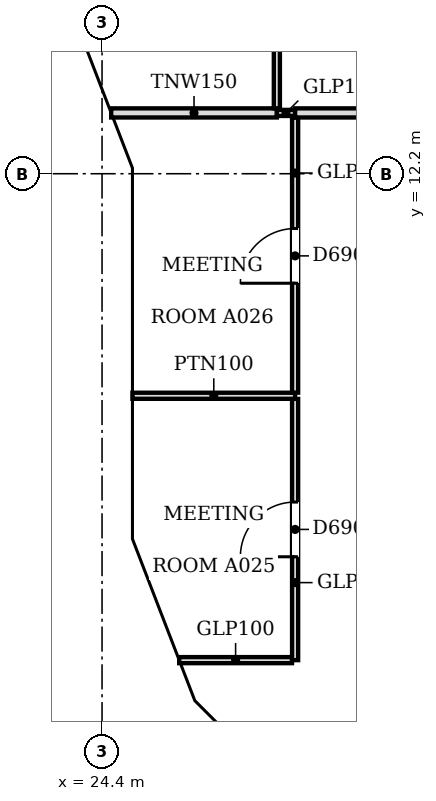
"""IFC4 building model, lengths in metres.
Left out: names, types, materials, properties, quantities, classifications, styles, units other than length and angle.
Written with IfcOpenShell. Run it as: python <this file> out.ifc"""

import sys

from ifc_helpers import new_model, si_unit, direction, frame, frame_2d, origin, place, context, subcontext, project, spatial, polyline, rectangle, outline, extrude, faceted_brep, source, transform, mapped, element, fill, save


model = new_model("IFC4")
c1 = context("Model", 3, precision=1e-05, world=origin(), true_north=direction((0.0, 1.0)))
c2 = subcontext(c1, "Body", "Model", "MODEL_VIEW")
j1 = project(units=[si_unit("LENGTHUNIT", "METRE"), si_unit("PLANEANGLEUNIT", "RADIAN")], contexts=[c1])
p1 = place(None, origin())
s1 = spatial("IfcSite", under=j1, at=p1, CompositionType="ELEMENT")
p2 = place(p1, origin())
s2 = spatial("IfcBuilding", under=s1, at=p2, CompositionType="ELEMENT")
p3 = place(p2, frame((0.0, 0.0, 209.3)))
s3 = spatial("IfcBuildingStorey", under=s2, at=p3, CompositionType="ELEMENT", Elevation=209.3)
m1 = source(origin(), c2, "Body", "Brep", [
    faceted_brep([(3.103, -0.25, 7.544), (0.053, -0.25, 3.864), (0.053, -0.25, 3.736), (3.103, -0.25, 0.056), (0.0, 0.25, 3.8), (3.149, 0.25, 7.6), (3.196, 0.25, 7.543), (3.196, 0.25, 0.057), (3.149, 0.25, 0.0), (3.149, -0.0, 0.0), (3.149, -0.0, 7.6), (0.0, 0.0, 3.8)], [[[0, 1, 2, 3]], [[4, 5, 6, 7, 8]], [[8, 7, 9]], [[6, 5, 10]], [[5, 4, 11, 1, 0, 10]], [[4, 8, 9, 3, 2, 11]], [[11, 2, 1]], [[3, 9, 7, 6, 10, 0]]]),
])
p4 = place(p3, frame((23.517, 15.185, -3.8), z_axis=(0.0, 0.0, 1.0), x_axis=(0.359864468756, -0.933004589553, 0.0)))
e1 = element("IfcWall", 1, at=p4, inside=s3, PredefinedType="SOLIDWALL", context=c2, shape_type="MappedRepresentation", body=[
    mapped(m1, transform((0.0, 0.0, 0.0), scale=1.0)),
])
m2 = source(origin(), c2, "Body", "SweptSolid", [
    extrude(outline(polyline([(2.949, 6.967), (0.325, 3.8), (2.949, 0.633), (2.949, 6.967)])), frame((0.0, 0.26, 0.0), z_axis=(0.0, -1.0, 0.0), x_axis=(1.0, 0.0, 0.0)), (0.0, 0.0, 1.0), 0.52),
])
p5 = place(p4, origin())
e2 = element("IfcOpeningElement", 2, at=p5, cuts=e1, PredefinedType="OPENING", context=c2, shape_type="MappedRepresentation", body=[
    mapped(m2, transform((0.0, 0.0, 0.0), scale=1.0)),
])
m3 = source(origin(), c2, "Body", "Brep", [
    faceted_brep([(0.093, -0.25, 0.057), (3.143, -0.25, 3.8), (0.093, -0.25, 7.543), (0.0, 0.25, 7.544), (0.047, 0.25, 7.6), (3.143, 0.25, 3.8), (0.047, 0.25, 0.0), (0.0, 0.25, 0.056), (0.047, 0.0, 0.0), (0.047, 0.0, 7.6)], [[[0, 1, 2]], [[3, 4, 5, 6, 7]], [[6, 5, 1, 0, 8]], [[5, 4, 9, 2, 1]], [[4, 3, 9]], [[7, 6, 8]], [[7, 8, 0, 2, 9, 3]]]),
])
p6 = place(p3, frame((24.65, 12.293, -3.8), z_axis=(0.0, 0.0, 1.0), x_axis=(0.0, -1.0, 0.0)))
e3 = element("IfcWall", 3, at=p6, inside=s3, PredefinedType="SOLIDWALL", context=c2, shape_type="MappedRepresentation", body=[
    mapped(m3, transform((0.0, 0.0, 0.0), scale=1.0)),
])
m4 = source(origin(), c2, "Body", "SweptSolid", [
    extrude(outline(polyline([(0.247, 0.641), (2.821, 3.8), (0.247, 6.959), (0.247, 0.641)])), frame((0.0, 0.26, 0.0), z_axis=(0.0, -1.0, 0.0), x_axis=(1.0, 0.0, 0.0)), (0.0, 0.0, 1.0), 0.52),
])
p7 = place(p6, origin())
e4 = element("IfcOpeningElement", 4, at=p7, cuts=e3, PredefinedType="OPENING", context=c2, shape_type="MappedRepresentation", body=[
    mapped(m4, transform((0.0, 0.0, 0.0), scale=1.0)),
])
m5 = source(origin(), c2, "Body", "Brep", [
    faceted_brep([(3.003, -0.25, 0.0), (3.05, -0.25, 0.06), (3.05, -0.25, 7.54), (3.003, -0.25, 7.6), (0.0, -0.25, 3.8), (0.0, 0.25, 3.8), (2.957, 0.25, 7.541), (2.957, 0.25, 0.059), (3.003, 0.0, 0.0), (3.003, 0.0, 7.6)], [[[0, 1, 2, 3, 4]], [[5, 6, 7]], [[1, 0, 8]], [[9, 3, 2]], [[6, 5, 4, 3, 9]], [[5, 7, 8, 0, 4]], [[1, 8, 7, 6, 9, 2]]]),
])
p8 = place(p3, frame((24.65, 9.15, -3.8), z_axis=(0.0, 0.0, 1.0), x_axis=(0.0, -1.0, 0.0)))
e5 = element("IfcWall", 5, at=p8, inside=s3, PredefinedType="SOLIDWALL", context=c2, shape_type="MappedRepresentation", body=[
    mapped(m5, transform((0.0, 0.0, 0.0), scale=1.0)),
])
m6 = source(origin(), c2, "Body", "SweptSolid", [
    extrude(outline(polyline([(2.803, 6.944), (0.319, 3.8), (2.803, 0.656), (2.803, 6.944)])), frame((0.0, 0.26, 0.0), z_axis=(0.0, -1.0, 0.0), x_axis=(1.0, 0.0, 0.0)), (0.0, 0.0, 1.0), 0.52),
])
p9 = place(p8, origin())
e6 = element("IfcOpeningElement", 6, at=p9, cuts=e5, PredefinedType="OPENING", context=c2, shape_type="MappedRepresentation", body=[
    mapped(m6, transform((0.0, 0.0, 0.0), scale=1.0)),
])
m7 = source(origin(), c2, "Body", "Brep", [
    faceted_brep([(0.047, -0.25, 0.0), (2.997, -0.25, 3.8), (0.047, -0.25, 7.6), (0.0, -0.25, 7.541), (0.0, -0.25, 0.059), (0.093, 0.25, 7.54), (2.944, 0.25, 3.868), (2.944, 0.25, 3.732), (0.093, 0.25, 0.06), (2.997, 0.0, 3.8), (0.047, 0.0, 0.0), (0.047, 0.0, 7.6)], [[[0, 1, 2, 3, 4]], [[5, 6, 7, 8]], [[8, 7, 9, 1, 0, 10]], [[6, 5, 11, 2, 1, 9]], [[3, 2, 11]], [[10, 0, 4]], [[8, 10, 4, 3, 11, 5]], [[9, 7, 6]]]),
])
p10 = place(p3, frame((24.633, 6.19, -3.8), z_axis=(0.0, 0.0, 1.0), x_axis=(0.359901446078, -0.932990326376, 0.0)))
e7 = element("IfcWall", 7, at=p10, inside=s3, PredefinedType="SOLIDWALL", context=c2, shape_type="MappedRepresentation", body=[
    mapped(m7, transform((0.0, 0.0, 0.0), scale=1.0)),
])
m8 = source(origin(), c2, "Body", "SweptSolid", [
    extrude(outline(polyline([(0.247, 0.665), (2.681, 3.8), (0.247, 6.935), (0.247, 0.665)])), frame((0.0, 0.26, 0.0), z_axis=(0.0, -1.0, 0.0), x_axis=(1.0, 0.0, 0.0)), (0.0, 0.0, 1.0), 0.52),
])
p11 = place(p10, origin())
e8 = element("IfcOpeningElement", 8, at=p11, cuts=e7, PredefinedType="OPENING", context=c2, shape_type="MappedRepresentation", body=[
    mapped(m8, transform((0.0, 0.0, 0.0), scale=1.0)),
])
m9 = source(origin(), c2, "Body", "Brep", [
    faceted_brep([(2.944, -0.25, 0.0), (2.997, -0.25, 0.068), (2.997, -0.25, 7.532), (2.944, -0.25, 7.6), (0.0, -0.25, 3.8), (0.053, 0.25, 3.868), (2.891, 0.25, 7.532), (2.891, 0.25, 0.068), (0.053, 0.25, 3.732), (2.944, 0.0, 0.0), (2.944, 0.0, 7.6), (0.0, 0.0, 3.8)], [[[0, 1, 2, 3, 4]], [[5, 6, 7, 8]], [[1, 0, 9]], [[10, 3, 2]], [[6, 5, 11, 4, 3, 10]], [[8, 7, 9, 0, 4, 11]], [[8, 11, 5]], [[1, 9, 7, 6, 10, 2]]]),
])
p12 = place(p3, frame((25.712, 3.394, -3.8), z_axis=(0.0, 0.0, 1.0), x_axis=(0.707066050402, -0.707147509625, 0.0)))
e9 = element("IfcWall", 9, at=p12, inside=s3, PredefinedType="SOLIDWALL", context=c2, shape_type="MappedRepresentation", body=[
    mapped(m9, transform((0.0, 0.0, 0.0), scale=1.0)),
])
m10 = source(origin(), c2, "Body", "SweptSolid", [
    extrude(outline(polyline([(2.744, 6.934), (0.316, 3.8), (2.744, 0.666), (2.744, 6.934)])), frame((0.0, 0.26, 0.0), z_axis=(0.0, -1.0, 0.0), x_axis=(1.0, 0.0, 0.0)), (0.0, 0.0, 1.0), 0.52),
])
p13 = place(p12, origin())
e10 = element("IfcOpeningElement", 10, at=p13, cuts=e9, PredefinedType="OPENING", context=c2, shape_type="MappedRepresentation", body=[
    mapped(m10, transform((0.0, 0.0, 0.0), scale=1.0)),
])
p14 = place(p2, frame((0.0, 0.0, 213.1)))
s4 = spatial("IfcBuildingStorey", under=s2, at=p14, CompositionType="ELEMENT", Elevation=213.1)
m11 = source(origin(), c2, "Body", "Brep", [
    faceted_brep([(0.106, -0.25, 0.064), (3.156, -0.25, 3.744), (3.156, -0.25, 3.856), (0.106, -0.25, 7.536), (0.0, 0.25, 7.536), (0.053, 0.25, 7.6), (3.202, 0.25, 3.8), (0.053, 0.25, 0.0), (0.0, 0.25, 0.064), (3.202, -0.0, 3.8), (0.053, 0.0, 0.0), (0.053, 0.0, 7.6)], [[[0, 1, 2, 3]], [[4, 5, 6, 7, 8]], [[7, 6, 9, 1, 0, 10]], [[6, 5, 11, 3, 2, 9]], [[5, 4, 11]], [[8, 7, 10]], [[8, 10, 0, 3, 11, 4]], [[1, 9, 2]]]),
])
p15 = place(p14, frame((23.497, 15.234, -3.8), z_axis=(0.0, 0.0, 1.0), x_axis=(0.359913782069, -0.932985567668, 0.0)))
e11 = element("IfcWall", 11, at=p15, inside=s4, PredefinedType="SOLIDWALL", context=c2, shape_type="MappedRepresentation", body=[
    mapped(m11, transform((0.0, 0.0, 0.0), scale=1.0)),
])
m12 = source(origin(), c2, "Body", "SweptSolid", [
    extrude(outline(polyline([(0.253, 0.633), (2.878, 3.8), (0.253, 6.967), (0.253, 0.633)])), frame((0.0, 0.26, 0.0), z_axis=(0.0, -1.0, 0.0), x_axis=(1.0, 0.0, 0.0)), (0.0, 0.0, 1.0), 0.52),
])
p16 = place(p15, origin())
e12 = element("IfcOpeningElement", 12, at=p16, cuts=e11, PredefinedType="OPENING", context=c2, shape_type="MappedRepresentation", body=[
    mapped(m12, transform((0.0, 0.0, 0.0), scale=1.0)),
])
m13 = source(origin(), c2, "Body", "Brep", [
    faceted_brep([(3.096, -0.25, 0.0), (6.1, -0.25, 3.8), (3.096, -0.25, 7.6), (0.047, -0.25, 3.857), (0.047, -0.25, 3.743), (0.0, 0.25, 3.8), (3.096, 0.25, 7.6), (6.053, 0.25, 3.859), (6.053, 0.25, 3.741), (3.096, 0.25, 0.0), (6.1, -0.0, 3.8), (0.0, 0.0, 3.8)], [[[0, 1, 2, 3, 4]], [[5, 6, 7, 8, 9]], [[9, 8, 10, 1, 0]], [[7, 6, 2, 1, 10]], [[6, 5, 11, 3, 2]], [[5, 9, 0, 4, 11]], [[4, 3, 11]], [[8, 7, 10]]]),
])
p17 = place(p14, frame((24.65, 12.247, -3.8), z_axis=(0.0, 0.0, 1.0), x_axis=(0.0, -1.0, 0.0)))
e13 = element("IfcWall", 13, at=p17, inside=s4, PredefinedType="SOLIDWALL", context=c2, shape_type="MappedRepresentation", body=[
    mapped(m13, transform((0.0, 0.0, 0.0), scale=1.0)),
])
m14 = source(origin(), c2, "Body", "SweptSolid", [
    extrude(outline(polyline([(3.094, 0.399), (5.781, 3.8), (3.094, 7.2), (0.323, 3.8), (3.094, 0.399)])), frame((0.0, 0.26, 0.0), z_axis=(0.0, -1.0, 0.0), x_axis=(1.0, 0.0, 0.0)), (0.0, 0.0, 1.0), 0.52),
])
p18 = place(p17, origin())
e14 = element("IfcOpeningElement", 14, at=p18, cuts=e13, PredefinedType="OPENING", context=c2, shape_type="MappedRepresentation", body=[
    mapped(m14, transform((0.0, 0.0, 0.0), scale=1.0)),
])
m15 = source(origin(), c2, "Body", "Brep", [
    faceted_brep([(2.95, -0.25, 0.0), (3.003, -0.25, 0.068), (3.003, -0.25, 7.531), (2.95, -0.25, 7.6), (0.0, -0.25, 3.8), (0.047, 0.25, 3.86), (2.898, 0.25, 7.532), (2.898, 0.25, 0.068), (0.047, 0.25, 3.74), (2.95, 0.0, 0.0), (2.95, 0.0, 7.6), (0.0, 0.0, 3.8)], [[[0, 1, 2, 3, 4]], [[5, 6, 7, 8]], [[1, 0, 9]], [[10, 3, 2]], [[6, 5, 11, 4, 3, 10]], [[8, 7, 9, 0, 4, 11]], [[8, 11, 5]], [[1, 9, 7, 6, 10, 2]]]),
])
p19 = place(p14, frame((24.65, 6.146, -3.8), z_axis=(0.0, 0.0, 1.0), x_axis=(0.359953949349, -0.932970071518, 0.0)))
e15 = element("IfcWall", 15, at=p19, inside=s4, PredefinedType="SOLIDWALL", context=c2, shape_type="MappedRepresentation", body=[
    mapped(m15, transform((0.0, 0.0, 0.0), scale=1.0)),
])
m16 = source(origin(), c2, "Body", "SweptSolid", [
    extrude(outline(polyline([(2.75, 6.935), (0.316, 3.8), (2.75, 0.665), (2.75, 6.935)])), frame((0.0, 0.26, 0.0), z_axis=(0.0, -1.0, 0.0), x_axis=(1.0, 0.0, 0.0)), (0.0, 0.0, 1.0), 0.52),
])
p20 = place(p19, origin())
e16 = element("IfcOpeningElement", 16, at=p20, cuts=e15, PredefinedType="OPENING", context=c2, shape_type="MappedRepresentation", body=[
    mapped(m16, transform((0.0, 0.0, 0.0), scale=1.0)),
])
m17 = source(origin(), c2, "Body", "Brep", [
    faceted_brep([(0.053, -0.25, 0.0), (2.997, -0.25, 3.8), (0.053, -0.25, 7.6), (0.0, -0.25, 7.532), (0.0, -0.25, 0.068), (0.106, 0.25, 7.531), (2.944, 0.25, 3.868), (2.944, 0.25, 3.732), (0.106, 0.25, 0.068), (2.997, 0.0, 3.8), (0.053, 0.0, 0.0), (0.053, 0.0, 7.6)], [[[0, 1, 2, 3, 4]], [[5, 6, 7, 8]], [[8, 7, 9, 1, 0, 10]], [[6, 5, 11, 2, 1, 9]], [[3, 2, 11]], [[10, 0, 4]], [[8, 10, 4, 3, 11, 5]], [[7, 6, 9]]]),
])
p21 = place(p14, frame((25.675, 3.431, -3.8), z_axis=(0.0, 0.0, 1.0), x_axis=(0.707106781187, -0.707106781187, 0.0)))
e17 = element("IfcWall", 17, at=p21, inside=s4, PredefinedType="SOLIDWALL", context=c2, shape_type="MappedRepresentation", body=[
    mapped(m17, transform((0.0, 0.0, 0.0), scale=1.0)),
])
m18 = source(origin(), c2, "Body", "SweptSolid", [
    extrude(outline(polyline([(0.253, 0.666), (2.681, 3.8), (0.253, 6.934), (0.253, 0.666)])), frame((0.0, 0.26, 0.0), z_axis=(0.0, -1.0, 0.0), x_axis=(1.0, 0.0, 0.0)), (0.0, 0.0, 1.0), 0.52),
])
p22 = place(p21, origin())
e18 = element("IfcOpeningElement", 18, at=p22, cuts=e17, PredefinedType="OPENING", context=c2, shape_type="MappedRepresentation", body=[
    mapped(m18, transform((0.0, 0.0, 0.0), scale=1.0)),
])
p23 = place(p3, frame((25.669, 4.2, 0.0), z_axis=(0.0, 0.0, 1.0), x_axis=(1.0, 0.0, 0.0)))
e19 = element("IfcWall", 19, at=p23, inside=s3, PredefinedType="PARTITIONING", context=c2, shape_type="SweptSolid", body=[
    extrude(rectangle(XDim=1.855, YDim=0.1, at=frame_2d((0.928, 0.0))), origin(), (0.0, 0.0, 1.0), 3.067),
])
p24 = place(p3, frame((27.575, 4.2, 0.0), z_axis=(0.0, 0.0, 1.0), x_axis=(0.0, 1.0, 0.0)))
e20 = element("IfcWall", 20, at=p24, inside=s3, PredefinedType="PARTITIONING", context=c2, shape_type="SweptSolid", body=[
    extrude(rectangle(XDim=4.297, YDim=0.1, at=frame_2d((2.148, 0.0))), origin(), (0.0, 0.0, 1.0), 3.067),
])
m19 = source(origin(), c2, "Body", "SweptSolid", [
    extrude(rectangle(XDim=0.9, YDim=2.1, at=frame_2d((0.45, 1.05))), frame((0.0, 0.06, 0.0), z_axis=(0.0, -1.0, 0.0), x_axis=(1.0, 0.0, 0.0)), (0.0, 0.0, 1.0), 0.12),
])
p25 = place(p24, frame((1.7, 0.0, 0.0)))
e21 = element("IfcOpeningElement", 21, at=p25, cuts=e20, PredefinedType="OPENING", context=c2, shape_type="MappedRepresentation", body=[
    mapped(m19, transform((0.0, 0.0, 0.0), scale=1.0)),
])
p26 = place(p3, frame((24.9, 8.548, 0.0), z_axis=(0.0, 0.0, 1.0), x_axis=(1.0, 0.0, 0.0)))
e22 = element("IfcWall", 22, at=p26, inside=s3, PredefinedType="PARTITIONING", context=c2, shape_type="SweptSolid", body=[
    extrude(rectangle(XDim=2.675, YDim=0.1, at=frame_2d((1.337, 0.0))), origin(), (0.0, 0.0, 1.0), 3.067),
])
p27 = place(p3, frame((27.575, 8.599, 0.0), z_axis=(0.0, 0.0, 1.0), x_axis=(0.0, 1.0, 0.0)))
e23 = element("IfcWall", 23, at=p27, inside=s3, PredefinedType="PARTITIONING", context=c2, shape_type="SweptSolid", body=[
    extrude(rectangle(XDim=4.525, YDim=0.1, at=frame_2d((2.263, 0.0))), origin(), (0.0, 0.0, 1.0), 3.067),
])
p28 = place(p27, frame((1.8, 0.0, 0.0)))
e24 = element("IfcOpeningElement", 24, at=p28, cuts=e23, PredefinedType="OPENING", context=c2, shape_type="MappedRepresentation", body=[
    mapped(m19, transform((0.0, 0.0, 0.0), scale=1.0)),
])
p29 = place(p3, frame((24.55, 13.2, 0.0), z_axis=(0.0, 0.0, 1.0), x_axis=(1.0, 0.0, 0.0)))
e25 = element("IfcWall", 25, at=p29, inside=s3, PredefinedType="PARTITIONING", context=c2, shape_type="SweptSolid", body=[
    extrude(rectangle(XDim=2.725, YDim=0.15, at=frame_2d((1.362, 0.0))), origin(), (0.0, 0.0, 1.0), 3.067),
])
p30 = place(p3, frame((27.276, 13.2, 0.0), z_axis=(0.0, 0.0, 1.0), x_axis=(1.0, 0.0, 0.0)))
e26 = element("IfcWall", 26, at=p30, inside=s3, PredefinedType="PARTITIONING", context=c2, shape_type="SweptSolid", body=[
    extrude(rectangle(XDim=0.298, YDim=0.1, at=frame_2d((0.149, 0.0))), origin(), (0.0, 0.0, 1.0), 3.067),
])
p31 = place(p3, frame((27.575, 13.2, 0.0), z_axis=(0.0, 0.0, 1.0), x_axis=(1.0, 0.0, 0.0)))
e27 = element("IfcWall", 27, at=p31, inside=s3, PredefinedType="PARTITIONING", context=c2, shape_type="SweptSolid", body=[
    extrude(rectangle(XDim=16.349, YDim=0.15, at=frame_2d((8.175, 0.0))), origin(), (0.0, 0.0, 1.0), 3.067),
])
p32 = place(p3, frame((27.275, 13.276, 0.0), z_axis=(0.0, 0.0, 1.0), x_axis=(0.0, 1.0, 0.0)))
e28 = element("IfcWall", 28, at=p32, inside=s3, PredefinedType="PARTITIONING", context=c2, shape_type="SweptSolid", body=[
    extrude(rectangle(XDim=5.448, YDim=0.1, at=frame_2d((2.724, 0.0))), origin(), (0.0, 0.0, 1.0), 3.067),
])
p33 = place(p32, frame((2.3, 0.0, 0.0)))
e29 = element("IfcOpeningElement", 29, at=p33, cuts=e28, PredefinedType="OPENING", context=c2, shape_type="MappedRepresentation", body=[
    mapped(m19, transform((0.0, 0.0, 0.0), scale=1.0)),
])
m20 = source(origin(), c2, "Body", "SweptSolid", [
    extrude(rectangle(XDim=0.9, YDim=2.1, at=frame_2d((0.45, 1.05))), frame((0.0, 0.025, 0.0), z_axis=(0.0, -1.0, 0.0), x_axis=(1.0, 0.0, 0.0)), (0.0, 0.0, 1.0), 0.05),
])
p34 = place(p28, origin())
e30 = element("IfcDoor", 30, at=p34, inside=s3, OperationType="SINGLE_SWING_LEFT", PredefinedType="DOOR", context=c2, shape_type="MappedRepresentation", body=[
    mapped(m20, transform((0.0, 0.0, 0.0), scale=1.0)),
])
fill(e24, e30)
p35 = place(p25, origin())
e31 = element("IfcDoor", 31, at=p35, inside=s3, OperationType="SINGLE_SWING_LEFT", PredefinedType="DOOR", context=c2, shape_type="MappedRepresentation", body=[
    mapped(m20, transform((0.0, 0.0, 0.0), scale=1.0)),
])
fill(e21, e31)
save(model, sys.argv[1])
